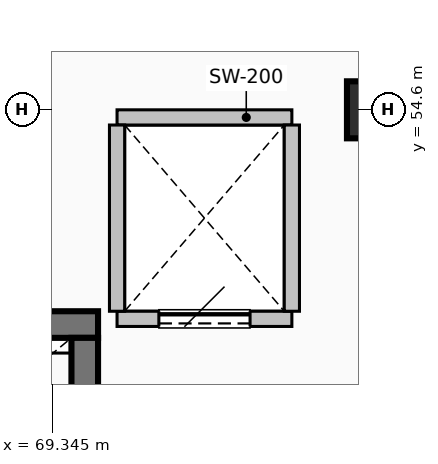
"""IFC4 building model, lengths in metres.
Left out: names, types, materials, properties, quantities, classifications, styles, units other than length and angle.
Written with IfcOpenShell. Run it as: python <this file> out.ifc"""

import sys

from ifc_helpers import new_model, si_unit, direction, frame, frame_2d, origin, origin_2d, place, context, subcontext, project, spatial, rectangle, extrude, element, fill, save


model = new_model("IFC4")
c1 = context("Model", 3, precision=1e-05, world=origin(), true_north=direction((0.0, 1.0)))
c2 = subcontext(c1, "Body", "Model", "MODEL_VIEW")
j1 = project(units=[si_unit("LENGTHUNIT", "METRE"), si_unit("PLANEANGLEUNIT", "RADIAN")], contexts=[c1])
p1 = place(None, origin())
s1 = spatial("IfcSite", under=j1, at=p1, CompositionType="ELEMENT")
p2 = place(p1, origin())
s2 = spatial("IfcBuilding", under=s1, at=p2, CompositionType="ELEMENT")
p3 = place(p2, frame((0.0, 0.0, 15.0)))
s3 = spatial("IfcBuildingStorey", under=s2, at=p3, CompositionType="ELEMENT", Elevation=15.0)
p4 = place(p3, frame((73.6, 54.6, 0.0), z_axis=(0.0, 0.0, 1.0), x_axis=(1.0, 0.0, 0.0)))
e1 = element("IfcColumn", 1, at=p4, inside=s3, PredefinedType="COLUMN", context=c2, shape_type="SweptSolid", body=[
    extrude(rectangle(XDim=0.75, YDim=0.75, at=origin_2d()), origin(), (0.0, 0.0, 1.0), 4.5),
])
p5 = place(p3, frame((69.95, 51.775, 0.0), z_axis=(0.0, 0.0, 1.0), x_axis=(-1.0, 0.0, 0.0)))
e2 = element("IfcWall", 2, at=p5, inside=s3, PredefinedType="SHEAR", context=c2, shape_type="SweptSolid", body=[
    extrude(rectangle(XDim=8.5, YDim=0.35, at=frame_2d((4.25, 0.0))), origin(), (0.0, 0.0, 1.0), 4.22),
])
p6 = place(p3, frame((69.775, 51.6, 0.0), z_axis=(0.0, 0.0, 1.0), x_axis=(0.0, -1.0, 0.0)))
e3 = element("IfcWall", 3, at=p6, inside=s3, PredefinedType="SHEAR", context=c2, shape_type="SweptSolid", body=[
    extrude(rectangle(XDim=3.8, YDim=0.35, at=frame_2d((1.9, 0.0))), origin(), (0.0, 0.0, 1.0), 4.22),
])
p7 = place(p3, frame((70.2, 51.85, 0.0), z_axis=(0.0, 0.0, 1.0), x_axis=(1.0, 0.0, 0.0)))
e4 = element("IfcWall", 4, at=p7, inside=s3, PredefinedType="PARTITIONING", context=c2, shape_type="SweptSolid", body=[
    extrude(rectangle(XDim=2.3, YDim=0.2, at=frame_2d((1.15, 0.0))), origin(), (0.0, 0.0, 1.0), 4.192),
])
p8 = place(p7, frame((0.55, 0.0, 0.0)))
e5 = element("IfcOpeningElement", 5, at=p8, cuts=e4, PredefinedType="OPENING", context=c2, shape_type="SweptSolid", body=[
    extrude(rectangle(XDim=1.2, YDim=2.15, at=frame_2d((0.6, 1.075))), frame((0.0, 0.11, 0.0), z_axis=(0.0, -1.0, 0.0), x_axis=(1.0, 0.0, 0.0)), (0.0, 0.0, 1.0), 0.22),
])
p9 = place(p3, frame((72.5, 54.5, 0.0), z_axis=(0.0, 0.0, 1.0), x_axis=(-1.0, 0.0, 0.0)))
e6 = element("IfcWall", 6, at=p9, inside=s3, PredefinedType="PARTITIONING", context=c2, shape_type="SweptSolid", body=[
    extrude(rectangle(XDim=2.3, YDim=0.2, at=frame_2d((1.15, 0.0))), origin(), (0.0, 0.0, 1.0), 3.462),
])
for number, where, z_axis, x_axis in (
    (7, (70.2, 51.95, 0.0), (0.0, 0.0, 1.0), (0.0, 1.0, 0.0)),
    (8, (72.5, 54.4, 0.0), (0.0, 0.0, 1.0), (0.0, -1.0, 0.0)),
):
    element("IfcWall", number, at=place(p3, frame(where, z_axis=z_axis, x_axis=x_axis)), inside=s3, PredefinedType="PARTITIONING", context=c2, shape_type="SweptSolid", body=[
        extrude(rectangle(XDim=2.45, YDim=0.2, at=frame_2d((1.225, 0.0))), origin(), (0.0, 0.0, 1.0), 4.192),
    ])
p10 = place(p8, origin())
e9 = element("IfcDoor", 9, at=p10, inside=s3, OperationType="SLIDING_TO_LEFT", PredefinedType="DOOR", context=c2, shape_type="SweptSolid", body=[
    extrude(rectangle(XDim=1.2, YDim=2.15, at=frame_2d((0.6, 1.075))), frame((0.0, 0.025, 0.0), z_axis=(0.0, -1.0, 0.0), x_axis=(1.0, 0.0, 0.0)), (0.0, 0.0, 1.0), 0.05),
])
fill(e5, e9)
save(model, sys.argv[1])
